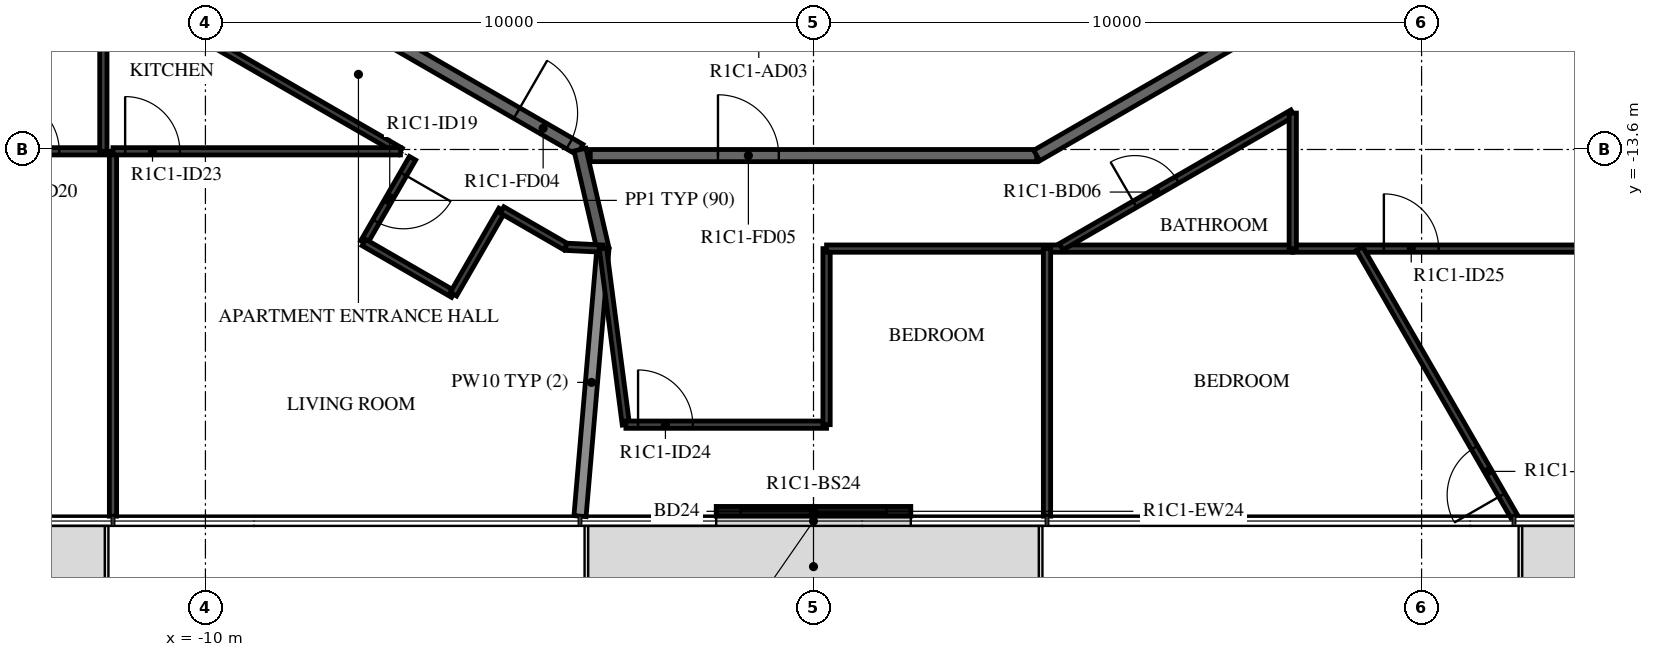
"""IFC4 building model, lengths in metres.
Left out: names, types, materials, properties, quantities, classifications, styles, units other than length and angle.
Written with IfcOpenShell. Run it as: python <this file> out.ifc"""

import sys

from ifc_helpers import new_model, si_unit, direction, frame, frame_2d, origin, place, context, subcontext, project, spatial, rectangle, extrude, element, fill, save


model = new_model("IFC4")
c1 = context("Model", 3, precision=1e-05, world=origin(), true_north=direction((0.0, 1.0)))
c2 = subcontext(c1, "Body", "Model", "MODEL_VIEW")
j1 = project(units=[si_unit("LENGTHUNIT", "METRE"), si_unit("PLANEANGLEUNIT", "RADIAN")], contexts=[c1])
p1 = place(None, origin())
s1 = spatial("IfcSite", under=j1, at=p1, CompositionType="ELEMENT")
p2 = place(p1, origin())
s2 = spatial("IfcBuilding", under=s1, at=p2, CompositionType="ELEMENT")
p3 = place(p2, frame((0.0, 0.0, 62.9)))
s3 = spatial("IfcBuildingStorey", under=s2, at=p3, CompositionType="ELEMENT", Elevation=62.9)
p4 = place(p3, frame((-1.6, -19.55, 0.0), z_axis=(0.0, 0.0, 1.0), x_axis=(1.0, 0.0, 0.0)))
e1 = element("IfcWall", 1, at=p4, inside=s3, PredefinedType="STANDARD", context=c2, shape_type="SweptSolid", body=[
    extrude(rectangle(XDim=3.2, YDim=0.16, at=frame_2d((1.6, 0.0))), origin(), (0.0, 0.0, 1.0), 3.12),
])
p5 = place(p4, frame((0.4, 0.0, 0.0)))
e2 = element("IfcOpeningElement", 2, at=p5, cuts=e1, PredefinedType="OPENING", context=c2, shape_type="SweptSolid", body=[
    extrude(rectangle(XDim=2.4, YDim=2.4, at=frame_2d((1.2, 1.2))), frame((0.0, 0.09, 0.0), z_axis=(0.0, -1.0, 0.0), x_axis=(1.0, 0.0, 0.0)), (0.0, 0.0, 1.0), 0.18),
])
p6 = place(p3, frame((-10.029, -10.029, 0.0), z_axis=(0.0, 0.0, 1.0), x_axis=(0.866022878987, -0.500004373052, 0.0)))
e3 = element("IfcWall", 3, at=p6, inside=s3, PredefinedType="STANDARD", context=c2, shape_type="SweptSolid", body=[
    extrude(rectangle(XDim=7.146, YDim=0.2, at=frame_2d((3.573, 0.0))), origin(), (0.0, 0.0, 1.0), 3.12),
])
p7 = place(p6, frame((5.947, 0.0, 0.0)))
e4 = element("IfcOpeningElement", 4, at=p7, cuts=e3, PredefinedType="OPENING", context=c2, shape_type="SweptSolid", body=[
    extrude(rectangle(XDim=1.0, YDim=2.1, at=frame_2d((0.5, 1.05))), frame((0.0, 0.11, 0.0), z_axis=(0.0, -1.0, 0.0), x_axis=(1.0, 0.0, 0.0)), (0.0, 0.0, 1.0), 0.22),
])
p8 = place(p3, frame((-3.671, -13.7, 0.0), z_axis=(0.0, 0.0, 1.0), x_axis=(1.0, 0.0, 0.0)))
e5 = element("IfcWall", 5, at=p8, inside=s3, PredefinedType="STANDARD", context=c2, shape_type="SweptSolid", body=[
    extrude(rectangle(XDim=7.342, YDim=0.2, at=frame_2d((3.671, 0.0))), origin(), (0.0, 0.0, 1.0), 3.12),
])
p9 = place(p8, frame((2.1, 0.0, 0.0)))
e6 = element("IfcOpeningElement", 6, at=p9, cuts=e5, PredefinedType="OPENING", context=c2, shape_type="SweptSolid", body=[
    extrude(rectangle(XDim=1.0, YDim=2.1, at=frame_2d((0.5, 1.05))), frame((0.0, 0.11, 0.0), z_axis=(0.0, -1.0, 0.0), x_axis=(1.0, 0.0, 0.0)), (0.0, 0.0, 1.0), 0.22),
])
p10 = place(p3, frame((3.671, -13.7, 0.0), z_axis=(0.0, 0.0, 1.0), x_axis=(0.866024439905, 0.500001669485, 0.0)))
e7 = element("IfcWall", 7, at=p10, inside=s3, PredefinedType="STANDARD", context=c2, shape_type="SweptSolid", body=[
    extrude(rectangle(XDim=7.342, YDim=0.2, at=frame_2d((3.671, 0.0))), origin(), (0.0, 0.0, 1.0), 3.12),
])
p11 = place(p3, frame((-3.463, -15.23, 0.0), z_axis=(0.0, 0.0, 1.0), x_axis=(-0.225894501138, 0.974151771725, 0.0)))
e8 = element("IfcWall", 8, at=p11, inside=s3, PredefinedType="STANDARD", context=c2, shape_type="SweptSolid", body=[
    extrude(rectangle(XDim=1.671, YDim=0.2, at=frame_2d((0.835, 0.0))), origin(), (0.0, 0.0, 1.0), 3.12),
])
p12 = place(p3, frame((-3.84, -19.63, 0.0), z_axis=(0.0, 0.0, 1.0), x_axis=(0.085470135005, 0.996340732893, 0.0)))
e9 = element("IfcWall", 9, at=p12, inside=s3, PredefinedType="STANDARD", context=c2, shape_type="SweptSolid", body=[
    extrude(rectangle(XDim=4.416, YDim=0.2, at=frame_2d((2.208, 0.0))), origin(), (0.0, 0.0, 1.0), 2.73),
])
p13 = place(p3, frame((-11.127, -11.127, 0.0), z_axis=(0.0, 0.0, 1.0), x_axis=(0.866034514313, -0.499984219769, 0.0)))
e10 = element("IfcWall", 10, at=p13, inside=s3, PredefinedType="PARTITIONING", context=c2, shape_type="SweptSolid", body=[
    extrude(rectangle(XDim=5.006, YDim=0.12, at=frame_2d((2.503, 0.0))), origin(), (0.0, 0.0, 1.0), 3.12),
])
p14 = place(p13, frame((0.2, 0.0, 0.0)))
e11 = element("IfcOpeningElement", 11, at=p14, cuts=e10, PredefinedType="OPENING", context=c2, shape_type="SweptSolid", body=[
    extrude(rectangle(XDim=0.9, YDim=2.1, at=frame_2d((0.45, 1.05))), frame((0.0, 0.07, 0.0), z_axis=(0.0, -1.0, 0.0), x_axis=(1.0, 0.0, 0.0)), (0.0, 0.0, 1.0), 0.14),
])
p15 = place(p3, frame((-6.594, -13.744, 0.0), z_axis=(0.0, 0.0, 1.0), x_axis=(-0.499947031044, -0.866055983265, 0.0)))
e12 = element("IfcWall", 12, at=p15, inside=s3, PredefinedType="PARTITIONING", context=c2, shape_type="SweptSolid", body=[
    extrude(rectangle(XDim=1.6, YDim=0.12, at=frame_2d((0.8, 0.0))), origin(), (0.0, 0.0, 1.0), 3.12),
])
p16 = place(p15, frame((0.3, 0.0, 0.0)))
e13 = element("IfcOpeningElement", 13, at=p16, cuts=e12, PredefinedType="OPENING", context=c2, shape_type="SweptSolid", body=[
    extrude(rectangle(XDim=0.9, YDim=2.1, at=frame_2d((0.45, 1.05))), frame((0.0, 0.07, 0.0), z_axis=(0.0, -1.0, 0.0), x_axis=(1.0, 0.0, 0.0)), (0.0, 0.0, 1.0), 0.14),
])
p17 = place(p3, frame((-7.394, -15.13, 0.0), z_axis=(0.0, 0.0, 1.0), x_axis=(0.86605165483, -0.499954529098, 0.0)))
e14 = element("IfcWall", 14, at=p17, inside=s3, PredefinedType="PARTITIONING", context=c2, shape_type="SweptSolid", body=[
    extrude(rectangle(XDim=1.7, YDim=0.12, at=frame_2d((0.85, 0.0))), origin(), (0.0, 0.0, 1.0), 3.12),
])
p18 = place(p3, frame((-5.922, -15.98, 0.0), z_axis=(0.0, 0.0, 1.0), x_axis=(0.500013115284, 0.866017831539, 0.0)))
e15 = element("IfcWall", 15, at=p18, inside=s3, PredefinedType="PARTITIONING", context=c2, shape_type="SweptSolid", body=[
    extrude(rectangle(XDim=1.6, YDim=0.12, at=frame_2d((0.8, 0.0))), origin(), (0.0, 0.0, 1.0), 3.12),
])
p19 = place(p3, frame((-5.122, -14.594, 0.0), z_axis=(0.0, 0.0, 1.0), x_axis=(0.86610168388, -0.499867855718, 0.0)))
e16 = element("IfcWall", 16, at=p19, inside=s3, PredefinedType="PARTITIONING", context=c2, shape_type="SweptSolid", body=[
    extrude(rectangle(XDim=1.211, YDim=0.12, at=frame_2d((0.605, 0.0))), origin(), (0.0, 0.0, 1.0), 3.12),
])
p20 = place(p3, frame((-4.073, -15.2, 0.0), z_axis=(0.0, 0.0, 1.0), x_axis=(0.99879090756, -0.049160176723, 0.0)))
e17 = element("IfcWall", 17, at=p20, inside=s3, PredefinedType="PARTITIONING", context=c2, shape_type="SweptSolid", body=[
    extrude(rectangle(XDim=0.611, YDim=0.12, at=frame_2d((0.305, 0.0))), origin(), (0.0, 0.0, 1.0), 3.12),
])
p21 = place(p3, frame((-19.794, -13.63, 0.0), z_axis=(0.0, 0.0, 1.0), x_axis=(1.0, 0.0, 0.0)))
e18 = element("IfcWall", 18, at=p21, inside=s3, PredefinedType="PARTITIONING", context=c2, shape_type="SweptSolid", body=[
    extrude(rectangle(XDim=8.156, YDim=0.12, at=frame_2d((4.078, 0.0))), origin(), (0.0, 0.0, 1.0), 3.12),
])
p22 = place(p21, frame((6.491, 0.0, 0.0)))
e19 = element("IfcOpeningElement", 19, at=p22, cuts=e18, PredefinedType="OPENING", context=c2, shape_type="SweptSolid", body=[
    extrude(rectangle(XDim=0.9, YDim=2.1, at=frame_2d((0.45, 1.05))), frame((0.0, 0.07, 0.0), z_axis=(0.0, -1.0, 0.0), x_axis=(1.0, 0.0, 0.0)), (0.0, 0.0, 1.0), 0.14),
])
p23 = place(p3, frame((-11.678, -13.63, 0.0), z_axis=(0.0, 0.0, 1.0), x_axis=(0.0, 1.0, 0.0)))
e20 = element("IfcWall", 20, at=p23, inside=s3, PredefinedType="PARTITIONING", context=c2, shape_type="SweptSolid", body=[
    extrude(rectangle(XDim=3.458, YDim=0.12, at=frame_2d((1.729, 0.0))), origin(), (0.0, 0.0, 1.0), 3.12),
])
p24 = place(p3, frame((-11.52, -19.63, 0.0), z_axis=(0.0, 0.0, 1.0), x_axis=(0.0, 1.0, 0.0)))
e21 = element("IfcWall", 21, at=p24, inside=s3, PredefinedType="PARTITIONING", context=c2, shape_type="SweptSolid", body=[
    extrude(rectangle(XDim=6.0, YDim=0.12, at=frame_2d((3.0, 0.0))), origin(), (0.0, 0.0, 1.0), 2.73),
])
p25 = place(p3, frame((-11.52, -13.63, 0.0), z_axis=(0.0, 0.0, 1.0), x_axis=(1.0, 0.0, 0.0)))
e22 = element("IfcWall", 22, at=p25, inside=s3, PredefinedType="PARTITIONING", context=c2, shape_type="SweptSolid", body=[
    extrude(rectangle(XDim=4.728, YDim=0.12, at=frame_2d((2.364, 0.0))), origin(), (0.0, 0.0, 1.0), 3.12),
])
p26 = place(p25, frame((0.2, 0.0, 0.0)))
e23 = element("IfcOpeningElement", 23, at=p26, cuts=e22, PredefinedType="OPENING", context=c2, shape_type="SweptSolid", body=[
    extrude(rectangle(XDim=0.9, YDim=2.1, at=frame_2d((0.45, 1.05))), frame((0.0, 0.07, 0.0), z_axis=(0.0, -1.0, 0.0), x_axis=(1.0, 0.0, 0.0)), (0.0, 0.0, 1.0), 0.14),
])
p27 = place(p3, frame((-3.463, -15.23, 0.0), z_axis=(0.0, 0.0, 1.0), x_axis=(0.129260547059, -0.991610665016, 0.0)))
e24 = element("IfcWall", 24, at=p27, inside=s3, PredefinedType="PARTITIONING", context=c2, shape_type="SweptSolid", body=[
    extrude(rectangle(XDim=2.92, YDim=0.12, at=frame_2d((1.46, 0.0))), origin(), (0.0, 0.0, 1.0), 3.12),
])
p28 = place(p3, frame((-3.085, -18.125, 0.0), z_axis=(0.0, 0.0, 1.0), x_axis=(1.0, 0.0, 0.0)))
e25 = element("IfcWall", 25, at=p28, inside=s3, PredefinedType="PARTITIONING", context=c2, shape_type="SweptSolid", body=[
    extrude(rectangle(XDim=3.3, YDim=0.12, at=frame_2d((1.65, 0.0))), origin(), (0.0, 0.0, 1.0), 3.12),
])
p29 = place(p28, frame((0.2, 0.0, 0.0)))
e26 = element("IfcOpeningElement", 26, at=p29, cuts=e25, PredefinedType="OPENING", context=c2, shape_type="SweptSolid", body=[
    extrude(rectangle(XDim=0.9, YDim=2.1, at=frame_2d((0.45, 1.05))), frame((0.0, 0.07, 0.0), z_axis=(0.0, -1.0, 0.0), x_axis=(1.0, 0.0, 0.0)), (0.0, 0.0, 1.0), 0.14),
])
p30 = place(p3, frame((0.215, -18.125, 0.0), z_axis=(0.0, 0.0, 1.0), x_axis=(0.0, 1.0, 0.0)))
e27 = element("IfcWall", 27, at=p30, inside=s3, PredefinedType="PARTITIONING", context=c2, shape_type="SweptSolid", body=[
    extrude(rectangle(XDim=2.896, YDim=0.12, at=frame_2d((1.448, 0.0))), origin(), (0.0, 0.0, 1.0), 3.12),
])
p31 = place(p3, frame((0.215, -15.23, 0.0), z_axis=(0.0, 0.0, 1.0), x_axis=(1.0, 0.0, 0.0)))
e28 = element("IfcWall", 28, at=p31, inside=s3, PredefinedType="PARTITIONING", context=c2, shape_type="SweptSolid", body=[
    extrude(rectangle(XDim=7.667, YDim=0.12, at=frame_2d((3.833, 0.0))), origin(), (0.0, 0.0, 1.0), 3.12),
])
p32 = place(p3, frame((7.881, -15.23, 0.0), z_axis=(0.0, 0.0, 1.0), x_axis=(1.0, 0.0, 0.0)))
e29 = element("IfcWall", 29, at=p32, inside=s3, PredefinedType="PARTITIONING", context=c2, shape_type="SweptSolid", body=[
    extrude(rectangle(XDim=12.006, YDim=0.12, at=frame_2d((6.003, 0.0))), origin(), (0.0, 0.0, 1.0), 3.12),
])
p33 = place(p32, frame((1.499, 0.0, 0.0)))
e30 = element("IfcOpeningElement", 30, at=p33, cuts=e29, PredefinedType="OPENING", context=c2, shape_type="SweptSolid", body=[
    extrude(rectangle(XDim=0.9, YDim=2.1, at=frame_2d((0.45, 1.05))), frame((0.0, 0.07, 0.0), z_axis=(0.0, -1.0, 0.0), x_axis=(1.0, 0.0, 0.0)), (0.0, 0.0, 1.0), 0.14),
])
p34 = place(p3, frame((4.073, -15.2, 0.0), z_axis=(0.0, 0.0, 1.0), x_axis=(0.866041369968, 0.499972344739, 0.0)))
e31 = element("IfcWall", 31, at=p34, inside=s3, PredefinedType="PARTITIONING", context=c2, shape_type="SweptSolid", body=[
    extrude(rectangle(XDim=4.398, YDim=0.12, at=frame_2d((2.199, 0.0))), origin(), (0.0, 0.0, 1.0), 3.12),
])
p35 = place(p34, frame((1.4, 0.0, 0.0)))
e32 = element("IfcOpeningElement", 32, at=p35, cuts=e31, PredefinedType="OPENING", context=c2, shape_type="SweptSolid", body=[
    extrude(rectangle(XDim=0.8, YDim=2.1, at=frame_2d((0.4, 1.05))), frame((0.0, 0.07, 0.0), z_axis=(0.0, -1.0, 0.0), x_axis=(1.0, 0.0, 0.0)), (0.0, 0.0, 1.0), 0.14),
])
p36 = place(p3, frame((7.881, -13.001, 0.0), z_axis=(0.0, 0.0, 1.0), x_axis=(0.0, -1.0, 0.0)))
e33 = element("IfcWall", 33, at=p36, inside=s3, PredefinedType="PARTITIONING", context=c2, shape_type="SweptSolid", body=[
    extrude(rectangle(XDim=2.229, YDim=0.12, at=frame_2d((1.114, 0.0))), origin(), (0.0, 0.0, 1.0), 3.12),
])
p37 = place(p3, frame((3.84, -19.63, 0.0), z_axis=(0.0, 0.0, 1.0), x_axis=(0.0, 1.0, 0.0)))
e34 = element("IfcWall", 34, at=p37, inside=s3, PredefinedType="PARTITIONING", context=c2, shape_type="SweptSolid", body=[
    extrude(rectangle(XDim=4.4, YDim=0.12, at=frame_2d((2.2, 0.0))), origin(), (0.0, 0.0, 1.0), 2.73),
])
p38 = place(p3, frame((11.52, -19.63, 0.0), z_axis=(0.0, 0.0, 1.0), x_axis=(-0.499999763888, 0.866025540104, 0.0)))
e35 = element("IfcWall", 35, at=p38, inside=s3, PredefinedType="PARTITIONING", context=c2, shape_type="SweptSolid", body=[
    extrude(rectangle(XDim=5.081, YDim=0.12, at=frame_2d((2.54, 0.0))), origin(), (0.0, 0.0, 1.0), 3.12),
])
p39 = place(p38, frame((0.4, 0.0, 0.0)))
e36 = element("IfcOpeningElement", 36, at=p39, cuts=e35, PredefinedType="OPENING", context=c2, shape_type="SweptSolid", body=[
    extrude(rectangle(XDim=0.9, YDim=2.1, at=frame_2d((0.45, 1.05))), frame((0.0, 0.07, 0.0), z_axis=(0.0, -1.0, 0.0), x_axis=(1.0, 0.0, 0.0)), (0.0, 0.0, 1.0), 0.14),
])
p40 = place(p5, origin())
e37 = element("IfcDoor", 37, at=p40, inside=s3, OperationType="DOUBLE_DOOR_SLIDING", PredefinedType="DOOR", context=c2, shape_type="SweptSolid", body=[
    extrude(rectangle(XDim=2.4, YDim=2.4, at=frame_2d((1.2, 1.2))), frame((0.0, 0.025, 0.0), z_axis=(0.0, -1.0, 0.0), x_axis=(1.0, 0.0, 0.0)), (0.0, 0.0, 1.0), 0.05),
])
fill(e2, e37)
p41 = place(p7, origin())
e38 = element("IfcDoor", 38, at=p41, inside=s3, OperationType="SINGLE_SWING_LEFT", PredefinedType="DOOR", context=c2, shape_type="SweptSolid", body=[
    extrude(rectangle(XDim=1.0, YDim=2.1, at=frame_2d((0.5, 1.05))), frame((0.0, 0.025, 0.0), z_axis=(0.0, -1.0, 0.0), x_axis=(1.0, 0.0, 0.0)), (0.0, 0.0, 1.0), 0.05),
])
fill(e4, e38)
p42 = place(p16, origin())
e39 = element("IfcDoor", 39, at=p42, inside=s3, OperationType="SINGLE_SWING_RIGHT", PredefinedType="DOOR", context=c2, shape_type="SweptSolid", body=[
    extrude(rectangle(XDim=0.9, YDim=2.1, at=frame_2d((0.45, 1.05))), frame((0.0, 0.025, 0.0), z_axis=(0.0, -1.0, 0.0), x_axis=(1.0, 0.0, 0.0)), (0.0, 0.0, 1.0), 0.05),
])
fill(e13, e39)
p43 = place(p22, origin())
e40 = element("IfcDoor", 40, at=p43, inside=s3, OperationType="SINGLE_SWING_LEFT", PredefinedType="DOOR", context=c2, shape_type="SweptSolid", body=[
    extrude(rectangle(XDim=0.9, YDim=2.1, at=frame_2d((0.45, 1.05))), frame((0.0, 0.025, 0.0), z_axis=(0.0, -1.0, 0.0), x_axis=(1.0, 0.0, 0.0)), (0.0, 0.0, 1.0), 0.05),
])
fill(e19, e40)
p44 = place(p26, origin())
e41 = element("IfcDoor", 41, at=p44, inside=s3, OperationType="SINGLE_SWING_RIGHT", PredefinedType="DOOR", context=c2, shape_type="SweptSolid", body=[
    extrude(rectangle(XDim=0.9, YDim=2.1, at=frame_2d((0.45, 1.05))), frame((0.0, 0.025, 0.0), z_axis=(0.0, -1.0, 0.0), x_axis=(1.0, 0.0, 0.0)), (0.0, 0.0, 1.0), 0.05),
])
fill(e23, e41)
p45 = place(p9, origin())
e42 = element("IfcDoor", 42, at=p45, inside=s3, OperationType="SINGLE_SWING_LEFT", PredefinedType="DOOR", context=c2, shape_type="SweptSolid", body=[
    extrude(rectangle(XDim=1.0, YDim=2.1, at=frame_2d((0.5, 1.05))), frame((0.0, 0.025, 0.0), z_axis=(0.0, -1.0, 0.0), x_axis=(1.0, 0.0, 0.0)), (0.0, 0.0, 1.0), 0.05),
])
fill(e6, e42)
p46 = place(p29, origin())
e43 = element("IfcDoor", 43, at=p46, inside=s3, OperationType="SINGLE_SWING_LEFT", PredefinedType="DOOR", context=c2, shape_type="SweptSolid", body=[
    extrude(rectangle(XDim=0.9, YDim=2.1, at=frame_2d((0.45, 1.05))), frame((0.0, 0.025, 0.0), z_axis=(0.0, -1.0, 0.0), x_axis=(1.0, 0.0, 0.0)), (0.0, 0.0, 1.0), 0.05),
])
fill(e26, e43)
p47 = place(p35, origin())
e44 = element("IfcDoor", 44, at=p47, inside=s3, OperationType="SINGLE_SWING_RIGHT", PredefinedType="DOOR", context=c2, shape_type="SweptSolid", body=[
    extrude(rectangle(XDim=0.8, YDim=2.1, at=frame_2d((0.4, 1.05))), frame((0.0, 0.025, 0.0), z_axis=(0.0, -1.0, 0.0), x_axis=(1.0, 0.0, 0.0)), (0.0, 0.0, 1.0), 0.05),
])
fill(e32, e44)
p48 = place(p33, origin())
e45 = element("IfcDoor", 45, at=p48, inside=s3, OperationType="SINGLE_SWING_RIGHT", PredefinedType="DOOR", context=c2, shape_type="SweptSolid", body=[
    extrude(rectangle(XDim=0.9, YDim=2.1, at=frame_2d((0.45, 1.05))), frame((0.0, 0.025, 0.0), z_axis=(0.0, -1.0, 0.0), x_axis=(1.0, 0.0, 0.0)), (0.0, 0.0, 1.0), 0.05),
])
fill(e30, e45)
p49 = place(p39, origin())
e46 = element("IfcDoor", 46, at=p49, inside=s3, OperationType="SINGLE_SWING_LEFT", PredefinedType="DOOR", context=c2, shape_type="SweptSolid", body=[
    extrude(rectangle(XDim=0.9, YDim=2.1, at=frame_2d((0.45, 1.05))), frame((0.0, 0.025, 0.0), z_axis=(0.0, -1.0, 0.0), x_axis=(1.0, 0.0, 0.0)), (0.0, 0.0, 1.0), 0.05),
])
fill(e36, e46)
save(model, sys.argv[1])
